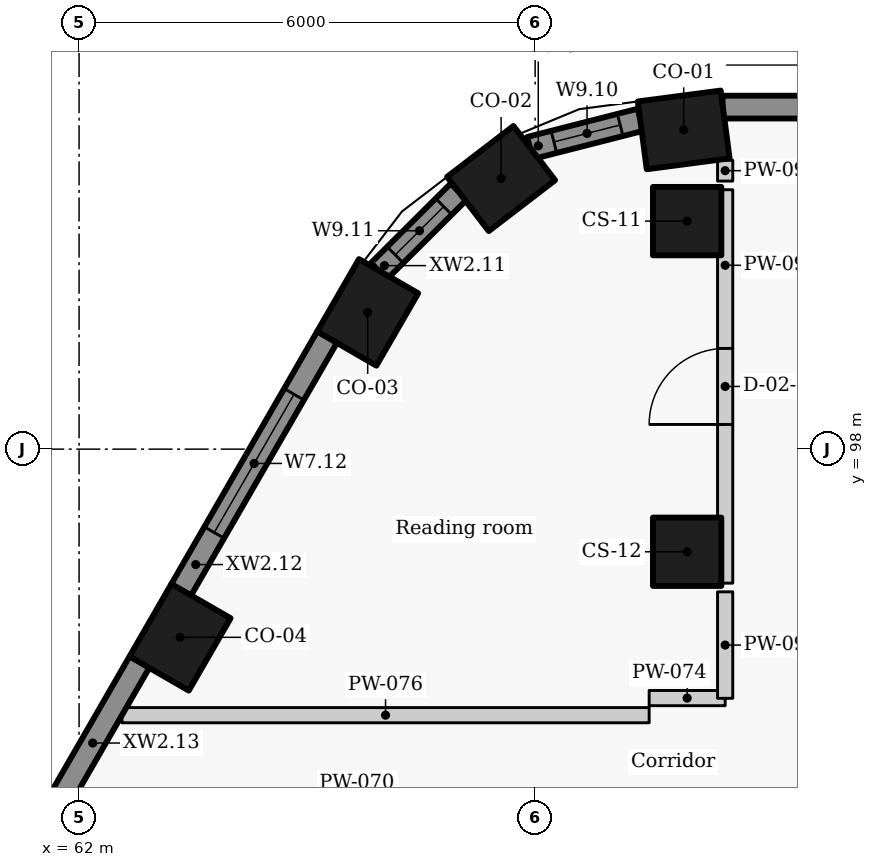
"""IFC4 building model, lengths in metres.
Left out: names, types, materials, properties, quantities, classifications, styles, units other than length and angle.
Written with IfcOpenShell. Run it as: python <this file> out.ifc"""

import sys

from ifc_helpers import new_model, si_unit, direction, frame, frame_2d, origin, origin_2d, place, context, subcontext, project, spatial, rectangle, extrude, element, fill, save


model = new_model("IFC4")
c1 = context("Model", 3, precision=1e-05, world=origin(), true_north=direction((0.0, 1.0)))
c2 = subcontext(c1, "Body", "Model", "MODEL_VIEW")
j1 = project(units=[si_unit("LENGTHUNIT", "METRE"), si_unit("PLANEANGLEUNIT", "RADIAN")], contexts=[c1])
p1 = place(None, origin())
s1 = spatial("IfcSite", under=j1, at=p1, CompositionType="ELEMENT")
p2 = place(p1, origin())
s2 = spatial("IfcBuilding", under=s1, at=p2, CompositionType="ELEMENT")
p3 = place(p2, frame((0.0, 0.0, 249.3)))
s3 = spatial("IfcBuildingStorey", under=s2, at=p3, CompositionType="ELEMENT", Elevation=249.3)
for number, where, z_axis, x_axis in (
    (1, (69.955, 102.2, 0.0), (0.0, 0.0, 1.0), (-0.991, -0.131, 0.0)),
    (2, (67.552, 101.56, 0.0), (0.0, 0.0, 1.0), (-0.793, -0.609, 0.0)),
    (3, (65.797, 99.8, 0.0), (0.0, 0.0, 1.0), (-0.5, -0.866, 0.0)),
    (4, (63.329, 95.525, 0.0), (0.0, 0.0, 1.0), (-0.5, -0.866, 0.0)),
):
    element("IfcColumn", number, at=place(p3, frame(where, z_axis=z_axis, x_axis=x_axis)), inside=s3, PredefinedType="COLUMN", context=c2, shape_type="SweptSolid", body=[
        extrude(rectangle(XDim=1.1, YDim=0.9, at=origin_2d()), origin(), (0.0, 0.0, 1.0), 3.3),
    ])
for number, where, z_axis, x_axis in (
    (5, (70.0, 101.0, 0.0), (0.0, 0.0, 1.0), (0.0, -1.0, 0.0)),
    (6, (70.0, 96.65, 0.0), (0.0, 0.0, 1.0), (0.0, -1.0, 0.0)),
):
    element("IfcColumn", number, at=place(p3, frame(where, z_axis=z_axis, x_axis=x_axis)), inside=s3, PredefinedType="COLUMN", context=c2, shape_type="SweptSolid", body=[
        extrude(rectangle(XDim=0.9, YDim=0.9, at=origin_2d()), origin(), (0.0, 0.0, 1.0), 3.3),
    ])
p4 = place(p3, frame((89.499, 102.5, 0.0), z_axis=(0.0, 0.0, 1.0), x_axis=(-1.0, 0.0, 0.0)))
e7 = element("IfcWall", 7, at=p4, inside=s3, PredefinedType="SOLIDWALL", context=c2, shape_type="SweptSolid", body=[
    extrude(rectangle(XDim=19.033, YDim=0.3, at=frame_2d((9.517, 0.0))), origin(), (0.0, 0.0, 1.0), 2.425),
])
p5 = place(p3, frame((69.386, 102.333, 0.0), z_axis=(0.0, 0.0, 1.0), x_axis=(-0.968895303033, -0.247470991757, 0.0)))
e8 = element("IfcWall", 8, at=p5, inside=s3, PredefinedType="SOLIDWALL", context=c2, shape_type="SweptSolid", body=[
    extrude(rectangle(XDim=1.5, YDim=0.3, at=frame_2d((0.75, 0.0))), origin(), (0.0, 0.0, 1.0), 2.425),
])
p6 = place(p5, frame((0.276, 0.0, 0.9)))
e9 = element("IfcOpeningElement", 9, at=p6, cuts=e8, PredefinedType="OPENING", context=c2, shape_type="SweptSolid", body=[
    extrude(rectangle(XDim=0.9, YDim=1.1, at=frame_2d((0.45, 0.55))), frame((0.0, 0.16, 0.0), z_axis=(0.0, -1.0, 0.0), x_axis=(1.0, 0.0, 0.0)), (0.0, 0.0, 1.0), 0.32),
])
p7 = place(p3, frame((66.996, 101.388, 0.0), z_axis=(0.0, 0.0, 1.0), x_axis=(-0.708589353117, -0.705621094249, 0.0)))
e10 = element("IfcWall", 10, at=p7, inside=s3, PredefinedType="SOLIDWALL", context=c2, shape_type="SweptSolid", body=[
    extrude(rectangle(XDim=1.48, YDim=0.3, at=frame_2d((0.74, 0.0))), origin(), (0.0, 0.0, 1.0), 2.425),
])
p8 = place(p7, frame((0.28, 0.0, 0.9)))
e11 = element("IfcOpeningElement", 11, at=p8, cuts=e10, PredefinedType="OPENING", context=c2, shape_type="SweptSolid", body=[
    extrude(rectangle(XDim=0.9, YDim=1.1, at=frame_2d((0.45, 0.55))), frame((0.0, 0.16, 0.0), z_axis=(0.0, -1.0, 0.0), x_axis=(1.0, 0.0, 0.0)), (0.0, 0.0, 1.0), 0.32),
])
p9 = place(p3, frame((65.264, 99.477, 0.0), z_axis=(0.0, 0.0, 1.0), x_axis=(-0.499984490703, -0.866034357896, 0.0)))
e12 = element("IfcWall", 12, at=p9, inside=s3, PredefinedType="SOLIDWALL", context=c2, shape_type="SweptSolid", body=[
    extrude(rectangle(XDim=3.844, YDim=0.3, at=frame_2d((1.922, 0.0))), origin(), (0.0, 0.0, 1.0), 2.425),
])
p10 = place(p9, frame((0.872, 0.0, 0.9)))
e13 = element("IfcOpeningElement", 13, at=p10, cuts=e12, PredefinedType="OPENING", context=c2, shape_type="SweptSolid", body=[
    extrude(rectangle(XDim=2.1, YDim=1.1, at=frame_2d((1.05, 0.55))), frame((0.0, 0.16, 0.0), z_axis=(0.0, -1.0, 0.0), x_axis=(1.0, 0.0, 0.0)), (0.0, 0.0, 1.0), 0.32),
])
p11 = place(p3, frame((62.796, 95.202, 0.0), z_axis=(0.0, 0.0, 1.0), x_axis=(-0.499984490703, -0.866034357896, 0.0)))
e14 = element("IfcWall", 14, at=p11, inside=s3, PredefinedType="SOLIDWALL", context=c2, shape_type="SweptSolid", body=[
    extrude(rectangle(XDim=3.844, YDim=0.3, at=frame_2d((1.922, 0.0))), origin(), (0.0, 0.0, 1.0), 2.425),
])
p12 = place(p11, frame((2.567, 0.0, 0.9)))
e15 = element("IfcOpeningElement", 15, at=p12, cuts=e14, PredefinedType="OPENING", context=c2, shape_type="SweptSolid", body=[
    extrude(rectangle(XDim=0.9, YDim=1.1, at=frame_2d((0.45, 0.55))), frame((0.0, 0.16, 0.0), z_axis=(0.0, -1.0, 0.0), x_axis=(1.0, 0.0, 0.0)), (0.0, 0.0, 1.0), 0.32),
])
p13 = place(p3, frame((69.5, 94.725, 0.0), z_axis=(0.0, 0.0, 1.0), x_axis=(1.0, 0.0, 0.0)))
e16 = element("IfcWall", 16, at=p13, inside=s3, PredefinedType="PARTITIONING", context=c2, shape_type="SweptSolid", body=[
    extrude(rectangle(XDim=1.0, YDim=0.2, at=frame_2d((0.5, 0.0))), origin(), (0.0, 0.0, 1.0), 2.505),
])
p14 = place(p3, frame((62.564, 94.5, 0.0), z_axis=(0.0, 0.0, 1.0), x_axis=(1.0, 0.0, 0.0)))
e17 = element("IfcWall", 17, at=p14, inside=s3, PredefinedType="PARTITIONING", context=c2, shape_type="SweptSolid", body=[
    extrude(rectangle(XDim=6.936, YDim=0.2, at=frame_2d((3.468, 0.0))), origin(), (0.0, 0.0, 1.0), 2.405),
])
p15 = place(p3, frame((70.5, 94.722, 0.0), z_axis=(0.0, 0.0, 1.0), x_axis=(0.0, 1.0, 0.0)))
e18 = element("IfcWall", 18, at=p15, inside=s3, PredefinedType="PARTITIONING", context=c2, shape_type="SweptSolid", body=[
    extrude(rectangle(XDim=1.401, YDim=0.2, at=frame_2d((0.701, 0.0))), origin(), (0.0, 0.0, 1.0), 3.025),
])
p16 = place(p3, frame((70.5, 96.237, 0.0), z_axis=(0.0, 0.0, 1.0), x_axis=(0.0, 1.0, 0.0)))
e19 = element("IfcWall", 19, at=p16, inside=s3, PredefinedType="PARTITIONING", context=c2, shape_type="SweptSolid", body=[
    extrude(rectangle(XDim=5.176, YDim=0.2, at=frame_2d((2.588, 0.0))), origin(), (0.0, 0.0, 1.0), 3.025),
])
p17 = place(p16, frame((2.088, 0.0, 0.0)))
e20 = element("IfcOpeningElement", 20, at=p17, cuts=e19, PredefinedType="OPENING", context=c2, shape_type="SweptSolid", body=[
    extrude(rectangle(XDim=1.0, YDim=2.1, at=frame_2d((0.5, 1.05))), frame((0.0, 0.11, 0.0), z_axis=(0.0, -1.0, 0.0), x_axis=(1.0, 0.0, 0.0)), (0.0, 0.0, 1.0), 0.22),
])
p18 = place(p3, frame((70.5, 101.527, 0.0), z_axis=(0.0, 0.0, 1.0), x_axis=(0.0, 1.0, 0.0)))
e21 = element("IfcWall", 21, at=p18, inside=s3, PredefinedType="PARTITIONING", context=c2, shape_type="SweptSolid", body=[
    extrude(rectangle(XDim=0.274, YDim=0.2, at=frame_2d((0.137, 0.0))), origin(), (0.0, 0.0, 1.0), 3.025),
])
p19 = place(p6, origin())
e22 = element("IfcWindow", 22, at=p19, inside=s3, PartitioningType="SINGLE_PANEL", PredefinedType="WINDOW", context=c2, shape_type="SweptSolid", body=[
    extrude(rectangle(XDim=0.9, YDim=1.1, at=frame_2d((0.45, 0.55))), frame((0.0, 0.03, 0.0), z_axis=(0.0, -1.0, 0.0), x_axis=(1.0, 0.0, 0.0)), (0.0, 0.0, 1.0), 0.06),
])
fill(e9, e22)
p20 = place(p8, origin())
e23 = element("IfcWindow", 23, at=p20, inside=s3, PartitioningType="SINGLE_PANEL", PredefinedType="WINDOW", context=c2, shape_type="SweptSolid", body=[
    extrude(rectangle(XDim=0.9, YDim=1.1, at=frame_2d((0.45, 0.55))), frame((0.0, 0.03, 0.0), z_axis=(0.0, -1.0, 0.0), x_axis=(1.0, 0.0, 0.0)), (0.0, 0.0, 1.0), 0.06),
])
fill(e11, e23)
p21 = place(p10, origin())
e24 = element("IfcWindow", 24, at=p21, inside=s3, PartitioningType="SINGLE_PANEL", PredefinedType="WINDOW", context=c2, shape_type="SweptSolid", body=[
    extrude(rectangle(XDim=2.1, YDim=1.1, at=frame_2d((1.05, 0.55))), frame((0.0, 0.03, 0.0), z_axis=(0.0, -1.0, 0.0), x_axis=(1.0, 0.0, 0.0)), (0.0, 0.0, 1.0), 0.06),
])
fill(e13, e24)
p22 = place(p17, origin())
e25 = element("IfcDoor", 25, at=p22, inside=s3, OperationType="SINGLE_SWING_LEFT", PredefinedType="DOOR", context=c2, shape_type="SweptSolid", body=[
    extrude(rectangle(XDim=1.0, YDim=2.1, at=frame_2d((0.5, 1.05))), frame((0.0, 0.025, 0.0), z_axis=(0.0, -1.0, 0.0), x_axis=(1.0, 0.0, 0.0)), (0.0, 0.0, 1.0), 0.05),
])
fill(e20, e25)
save(model, sys.argv[1])
